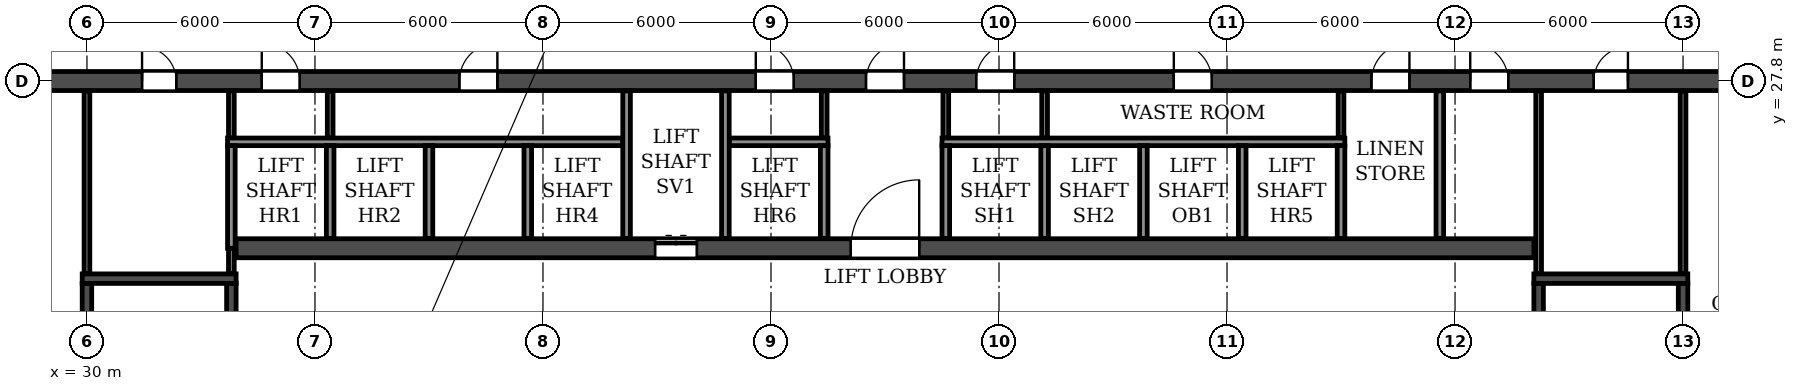
"""IFC4 building model, lengths in metres.
Left out: names, types, materials, properties, quantities, classifications, styles, units other than length and angle.
Written with IfcOpenShell. Run it as: python <this file> out.ifc"""

import sys

from ifc_helpers import new_model, si_unit, direction, frame, frame_2d, origin, place, context, subcontext, project, spatial, rectangle, extrude, element, fill, save


model = new_model("IFC4")
c1 = context("Model", 3, precision=1e-05, world=origin(), true_north=direction((0.0, 1.0)))
c2 = subcontext(c1, "Body", "Model", "MODEL_VIEW")
j1 = project(units=[si_unit("LENGTHUNIT", "METRE"), si_unit("PLANEANGLEUNIT", "RADIAN")], contexts=[c1])
p1 = place(None, origin())
s1 = spatial("IfcSite", under=j1, at=p1, CompositionType="ELEMENT")
p2 = place(p1, origin())
s2 = spatial("IfcBuilding", under=s1, at=p2, CompositionType="ELEMENT")
p3 = place(p2, frame((0.0, 0.0, 112.5)))
s3 = spatial("IfcBuildingStorey", under=s2, at=p3, CompositionType="ELEMENT", Elevation=112.5)
p4 = place(p3, frame((14.6, 27.8, 0.0), z_axis=(0.0, 0.0, 1.0), x_axis=(1.0, 0.0, 0.0)))
e1 = element("IfcWall", 1, at=p4, inside=s3, PredefinedType="SOLIDWALL", context=c2, shape_type="SweptSolid", body=[
    extrude(rectangle(XDim=72.8, YDim=0.5, at=frame_2d((36.4, 0.0))), origin(), (0.0, 0.0, 1.0), 2.95),
])
p5 = place(p4, frame((1.2, 0.0, 0.0)))
e2 = element("IfcOpeningElement", 2, at=p5, cuts=e1, PredefinedType="OPENING", context=c2, shape_type="SweptSolid", body=[
    extrude(rectangle(XDim=1.0, YDim=2.1, at=frame_2d((0.5, 1.05))), frame((0.0, 0.26, 0.0), z_axis=(0.0, -1.0, 0.0), x_axis=(1.0, 0.0, 0.0)), (0.0, 0.0, 1.0), 0.52),
])
p6 = place(p4, frame((4.3, 0.0, 0.0)))
e3 = element("IfcOpeningElement", 3, at=p6, cuts=e1, PredefinedType="OPENING", context=c2, shape_type="SweptSolid", body=[
    extrude(rectangle(XDim=1.0, YDim=2.1, at=frame_2d((0.5, 1.05))), frame((0.0, 0.26, 0.0), z_axis=(0.0, -1.0, 0.0), x_axis=(1.0, 0.0, 0.0)), (0.0, 0.0, 1.0), 0.52),
])
p7 = place(p4, frame((7.65, 0.0, 0.0)))
e4 = element("IfcOpeningElement", 4, at=p7, cuts=e1, PredefinedType="OPENING", context=c2, shape_type="SweptSolid", body=[
    extrude(rectangle(XDim=0.9, YDim=2.1, at=frame_2d((0.45, 1.05))), frame((0.0, 0.26, 0.0), z_axis=(0.0, -1.0, 0.0), x_axis=(1.0, 0.0, 0.0)), (0.0, 0.0, 1.0), 0.52),
])
p8 = place(p4, frame((16.85, 0.0, 0.0)))
e5 = element("IfcOpeningElement", 5, at=p8, cuts=e1, PredefinedType="OPENING", context=c2, shape_type="SweptSolid", body=[
    extrude(rectangle(XDim=0.9, YDim=2.1, at=frame_2d((0.45, 1.05))), frame((0.0, 0.26, 0.0), z_axis=(0.0, -1.0, 0.0), x_axis=(1.0, 0.0, 0.0)), (0.0, 0.0, 1.0), 0.52),
])
p9 = place(p4, frame((20.0, 0.0, 0.0)))
e6 = element("IfcOpeningElement", 6, at=p9, cuts=e1, PredefinedType="OPENING", context=c2, shape_type="SweptSolid", body=[
    extrude(rectangle(XDim=1.0, YDim=2.1, at=frame_2d((0.5, 1.05))), frame((0.0, 0.26, 0.0), z_axis=(0.0, -1.0, 0.0), x_axis=(1.0, 0.0, 0.0)), (0.0, 0.0, 1.0), 0.52),
])
p10 = place(p4, frame((25.2, 0.0, 0.0)))
e7 = element("IfcOpeningElement", 7, at=p10, cuts=e1, PredefinedType="OPENING", context=c2, shape_type="SweptSolid", body=[
    extrude(rectangle(XDim=1.0, YDim=2.1, at=frame_2d((0.5, 1.05))), frame((0.0, 0.26, 0.0), z_axis=(0.0, -1.0, 0.0), x_axis=(1.0, 0.0, 0.0)), (0.0, 0.0, 1.0), 0.52),
])
p11 = place(p4, frame((33.0, 0.0, 0.0)))
e8 = element("IfcOpeningElement", 8, at=p11, cuts=e1, PredefinedType="OPENING", context=c2, shape_type="SweptSolid", body=[
    extrude(rectangle(XDim=1.0, YDim=2.1, at=frame_2d((0.5, 1.05))), frame((0.0, 0.26, 0.0), z_axis=(0.0, -1.0, 0.0), x_axis=(1.0, 0.0, 0.0)), (0.0, 0.0, 1.0), 0.52),
])
p12 = place(p4, frame((35.9, 0.0, 0.0)))
e9 = element("IfcOpeningElement", 9, at=p12, cuts=e1, PredefinedType="OPENING", context=c2, shape_type="SweptSolid", body=[
    extrude(rectangle(XDim=1.0, YDim=2.1, at=frame_2d((0.5, 1.05))), frame((0.0, 0.26, 0.0), z_axis=(0.0, -1.0, 0.0), x_axis=(1.0, 0.0, 0.0)), (0.0, 0.0, 1.0), 0.52),
])
p13 = place(p4, frame((38.8, 0.0, 0.0)))
e10 = element("IfcOpeningElement", 10, at=p13, cuts=e1, PredefinedType="OPENING", context=c2, shape_type="SweptSolid", body=[
    extrude(rectangle(XDim=1.0, YDim=2.1, at=frame_2d((0.5, 1.05))), frame((0.0, 0.26, 0.0), z_axis=(0.0, -1.0, 0.0), x_axis=(1.0, 0.0, 0.0)), (0.0, 0.0, 1.0), 0.52),
])
p14 = place(p4, frame((44.0, 0.0, 0.0)))
e11 = element("IfcOpeningElement", 11, at=p14, cuts=e1, PredefinedType="OPENING", context=c2, shape_type="SweptSolid", body=[
    extrude(rectangle(XDim=1.0, YDim=2.1, at=frame_2d((0.5, 1.05))), frame((0.0, 0.26, 0.0), z_axis=(0.0, -1.0, 0.0), x_axis=(1.0, 0.0, 0.0)), (0.0, 0.0, 1.0), 0.52),
])
p15 = place(p4, frame((49.2, 0.0, 0.0)))
e12 = element("IfcOpeningElement", 12, at=p15, cuts=e1, PredefinedType="OPENING", context=c2, shape_type="SweptSolid", body=[
    extrude(rectangle(XDim=1.0, YDim=2.1, at=frame_2d((0.5, 1.05))), frame((0.0, 0.26, 0.0), z_axis=(0.0, -1.0, 0.0), x_axis=(1.0, 0.0, 0.0)), (0.0, 0.0, 1.0), 0.52),
])
p16 = place(p4, frame((51.8, 0.0, 0.0)))
e13 = element("IfcOpeningElement", 13, at=p16, cuts=e1, PredefinedType="OPENING", context=c2, shape_type="SweptSolid", body=[
    extrude(rectangle(XDim=1.0, YDim=2.1, at=frame_2d((0.5, 1.05))), frame((0.0, 0.26, 0.0), z_axis=(0.0, -1.0, 0.0), x_axis=(1.0, 0.0, 0.0)), (0.0, 0.0, 1.0), 0.52),
])
p17 = place(p4, frame((55.05, 0.0, 0.0)))
e14 = element("IfcOpeningElement", 14, at=p17, cuts=e1, PredefinedType="OPENING", context=c2, shape_type="SweptSolid", body=[
    extrude(rectangle(XDim=0.9, YDim=2.1, at=frame_2d((0.45, 1.05))), frame((0.0, 0.26, 0.0), z_axis=(0.0, -1.0, 0.0), x_axis=(1.0, 0.0, 0.0)), (0.0, 0.0, 1.0), 0.52),
])
p18 = place(p4, frame((64.25, 0.0, 0.0)))
e15 = element("IfcOpeningElement", 15, at=p18, cuts=e1, PredefinedType="OPENING", context=c2, shape_type="SweptSolid", body=[
    extrude(rectangle(XDim=0.9, YDim=2.1, at=frame_2d((0.45, 1.05))), frame((0.0, 0.26, 0.0), z_axis=(0.0, -1.0, 0.0), x_axis=(1.0, 0.0, 0.0)), (0.0, 0.0, 1.0), 0.52),
])
p19 = place(p4, frame((67.5, 0.0, 0.0)))
e16 = element("IfcOpeningElement", 16, at=p19, cuts=e1, PredefinedType="OPENING", context=c2, shape_type="SweptSolid", body=[
    extrude(rectangle(XDim=1.0, YDim=2.1, at=frame_2d((0.5, 1.05))), frame((0.0, 0.26, 0.0), z_axis=(0.0, -1.0, 0.0), x_axis=(1.0, 0.0, 0.0)), (0.0, 0.0, 1.0), 0.52),
])
p20 = place(p4, frame((70.6, 0.0, 0.0)))
e17 = element("IfcOpeningElement", 17, at=p20, cuts=e1, PredefinedType="OPENING", context=c2, shape_type="SweptSolid", body=[
    extrude(rectangle(XDim=1.0, YDim=2.1, at=frame_2d((0.5, 1.05))), frame((0.0, 0.26, 0.0), z_axis=(0.0, -1.0, 0.0), x_axis=(1.0, 0.0, 0.0)), (0.0, 0.0, 1.0), 0.52),
])
p21 = place(p3, frame((33.925, 23.4, 0.0), z_axis=(0.0, 0.0, 1.0), x_axis=(1.0, 0.0, 0.0)))
e18 = element("IfcWall", 18, at=p21, inside=s3, PredefinedType="SOLIDWALL", context=c2, shape_type="SweptSolid", body=[
    extrude(rectangle(XDim=34.15, YDim=0.5, at=frame_2d((17.075, 0.0))), origin(), (0.0, 0.0, 1.0), 2.95),
])
p22 = place(p21, frame((16.175, 0.0, 0.0)))
e19 = element("IfcOpeningElement", 19, at=p22, cuts=e18, PredefinedType="OPENING", context=c2, shape_type="SweptSolid", body=[
    extrude(rectangle(XDim=1.8, YDim=2.1, at=frame_2d((0.9, 1.05))), frame((0.0, 0.26, 0.0), z_axis=(0.0, -1.0, 0.0), x_axis=(1.0, 0.0, 0.0)), (0.0, 0.0, 1.0), 0.52),
])
p23 = place(p21, frame((11.025, 0.0, 0.0)))
e20 = element("IfcOpeningElement", 20, at=p23, cuts=e18, PredefinedType="OPENING", context=c2, shape_type="SweptSolid", body=[
    extrude(rectangle(XDim=1.1, YDim=2.1, at=frame_2d((0.55, 1.05))), frame((0.0, 0.26, 0.0), z_axis=(0.0, -1.0, 0.0), x_axis=(1.0, 0.0, 0.0)), (0.0, 0.0, 1.0), 0.52),
])
p24 = place(p3, frame((30.0, 14.85, 0.0), z_axis=(0.0, 0.0, 1.0), x_axis=(0.0, 1.0, 0.0)))
e21 = element("IfcWall", 21, at=p24, inside=s3, PredefinedType="SOLIDWALL", context=c2, shape_type="SweptSolid", body=[
    extrude(rectangle(XDim=7.625, YDim=0.25, at=frame_2d((3.812, 0.0))), origin(), (0.0, 0.0, 1.0), 2.95),
])
p25 = place(p3, frame((33.8, 14.85, 0.0), z_axis=(0.0, 0.0, 1.0), x_axis=(0.0, 1.0, 0.0)))
e22 = element("IfcWall", 22, at=p25, inside=s3, PredefinedType="SOLIDWALL", context=c2, shape_type="SweptSolid", body=[
    extrude(rectangle(XDim=7.625, YDim=0.25, at=frame_2d((3.812, 0.0))), origin(), (0.0, 0.0, 1.0), 2.95),
])
p26 = place(p25, frame((0.45, 0.0, 0.0)))
e23 = element("IfcOpeningElement", 23, at=p26, cuts=e22, PredefinedType="OPENING", context=c2, shape_type="SweptSolid", body=[
    extrude(rectangle(XDim=1.0, YDim=2.1, at=frame_2d((0.5, 1.05))), frame((0.0, 0.135, 0.0), z_axis=(0.0, -1.0, 0.0), x_axis=(1.0, 0.0, 0.0)), (0.0, 0.0, 1.0), 0.27),
])
p27 = place(p3, frame((29.875, 22.6, 0.0), z_axis=(0.0, 0.0, 1.0), x_axis=(1.0, 0.0, 0.0)))
e24 = element("IfcWall", 24, at=p27, inside=s3, PredefinedType="SOLIDWALL", context=c2, shape_type="SweptSolid", body=[
    extrude(rectangle(XDim=4.05, YDim=0.25, at=frame_2d((2.025, 0.0))), origin(), (0.0, 0.0, 1.0), 2.95),
])
p28 = place(p3, frame((68.2, 14.85, 0.0), z_axis=(0.0, 0.0, 1.0), x_axis=(0.0, 1.0, 0.0)))
e25 = element("IfcWall", 25, at=p28, inside=s3, PredefinedType="SOLIDWALL", context=c2, shape_type="SweptSolid", body=[
    extrude(rectangle(XDim=7.625, YDim=0.25, at=frame_2d((3.812, 0.0))), origin(), (0.0, 0.0, 1.0), 2.95),
])
p29 = place(p28, frame((0.45, 0.0, 0.0)))
e26 = element("IfcOpeningElement", 26, at=p29, cuts=e25, PredefinedType="OPENING", context=c2, shape_type="SweptSolid", body=[
    extrude(rectangle(XDim=1.0, YDim=2.1, at=frame_2d((0.5, 1.05))), frame((0.0, 0.135, 0.0), z_axis=(0.0, -1.0, 0.0), x_axis=(1.0, 0.0, 0.0)), (0.0, 0.0, 1.0), 0.27),
])
p30 = place(p3, frame((72.0, 14.85, 0.0), z_axis=(0.0, 0.0, 1.0), x_axis=(0.0, 1.0, 0.0)))
e27 = element("IfcWall", 27, at=p30, inside=s3, PredefinedType="SOLIDWALL", context=c2, shape_type="SweptSolid", body=[
    extrude(rectangle(XDim=7.625, YDim=0.25, at=frame_2d((3.812, 0.0))), origin(), (0.0, 0.0, 1.0), 2.95),
])
p31 = place(p3, frame((68.075, 22.6, 0.0), z_axis=(0.0, 0.0, 1.0), x_axis=(1.0, 0.0, 0.0)))
e28 = element("IfcWall", 28, at=p31, inside=s3, PredefinedType="SOLIDWALL", context=c2, shape_type="SweptSolid", body=[
    extrude(rectangle(XDim=4.05, YDim=0.25, at=frame_2d((2.025, 0.0))), origin(), (0.0, 0.0, 1.0), 2.95),
])
for number, where, z_axis, x_axis in (
    (29, (49.4, 26.3, 0.0), (0.0, 0.0, 1.0), (0.0, 1.0, 0.0)),
    (30, (52.6, 26.3, 0.0), (0.0, 0.0, 1.0), (0.0, 1.0, 0.0)),
    (31, (36.4, 26.3, 0.0), (0.0, 0.0, 1.0), (0.0, 1.0, 0.0)),
    (32, (55.2, 26.3, 0.0), (0.0, 0.0, 1.0), (0.0, 1.0, 0.0)),
    (33, (63.0, 26.3, 0.0), (0.0, 0.0, 1.0), (0.0, 1.0, 0.0)),
):
    element("IfcWall", number, at=place(p3, frame(where, z_axis=z_axis, x_axis=x_axis)), inside=s3, PredefinedType="PARTITIONING", context=c2, shape_type="SweptSolid", body=[
        extrude(rectangle(XDim=1.24, YDim=0.15, at=frame_2d((0.62, 0.0))), origin(), (0.0, 0.0, 1.0), 2.95),
    ])
p32 = place(p3, frame((65.6, 23.66, 0.0), z_axis=(0.0, 0.0, 1.0), x_axis=(0.0, 1.0, 0.0)))
e34 = element("IfcWall", 34, at=p32, inside=s3, PredefinedType="PARTITIONING", context=c2, shape_type="SweptSolid", body=[
    extrude(rectangle(XDim=3.88, YDim=0.2, at=frame_2d((1.94, 0.0))), origin(), (0.0, 0.0, 1.0), 2.95),
])
p33 = place(p3, frame((30.0, 22.735, 0.0), z_axis=(0.0, 0.0, 1.0), x_axis=(0.0, 1.0, 0.0)))
e35 = element("IfcWall", 35, at=p33, inside=s3, PredefinedType="PARTITIONING", context=c2, shape_type="SweptSolid", body=[
    extrude(rectangle(XDim=4.805, YDim=0.15, at=frame_2d((2.402, 0.0))), origin(), (0.0, 0.0, 1.0), 2.95),
])
p34 = place(p3, frame((33.8, 22.735, 0.0), z_axis=(0.0, 0.0, 1.0), x_axis=(0.0, 1.0, 0.0)))
e36 = element("IfcWall", 36, at=p34, inside=s3, PredefinedType="PARTITIONING", context=c2, shape_type="SweptSolid", body=[
    extrude(rectangle(XDim=0.665, YDim=0.15, at=frame_2d((0.333, 0.0))), origin(), (0.0, 0.0, 1.0), 2.95),
])
p35 = place(p3, frame((33.8, 26.3, 0.0), z_axis=(0.0, 0.0, 1.0), x_axis=(0.0, 1.0, 0.0)))
e37 = element("IfcWall", 37, at=p35, inside=s3, PredefinedType="PARTITIONING", context=c2, shape_type="SweptSolid", body=[
    extrude(rectangle(XDim=1.24, YDim=0.15, at=frame_2d((0.62, 0.0))), origin(), (0.0, 0.0, 1.0), 2.95),
])
for number, where, z_axis, x_axis in (
    (38, (68.2, 22.735, 0.0), (0.0, 0.0, 1.0), (0.0, 1.0, 0.0)),
    (39, (72.0, 22.735, 0.0), (0.0, 0.0, 1.0), (0.0, 1.0, 0.0)),
):
    element("IfcWall", number, at=place(p3, frame(where, z_axis=z_axis, x_axis=x_axis)), inside=s3, PredefinedType="PARTITIONING", context=c2, shape_type="SweptSolid", body=[
        extrude(rectangle(XDim=4.805, YDim=0.15, at=frame_2d((2.402, 0.0))), origin(), (0.0, 0.0, 1.0), 2.95),
    ])
p36 = place(p3, frame((33.7, 26.2, 0.0), z_axis=(0.0, 0.0, 1.0), x_axis=(1.0, 0.0, 0.0)))
e40 = element("IfcWall", 40, at=p36, inside=s3, PredefinedType="PARTITIONING", context=c2, shape_type="SweptSolid", body=[
    extrude(rectangle(XDim=10.4, YDim=0.2, at=frame_2d((5.2, 0.0))), origin(), (0.0, 0.0, 1.0), 2.95),
])
p37 = place(p3, frame((46.9, 26.2, 0.0), z_axis=(0.0, 0.0, 1.0), x_axis=(1.0, 0.0, 0.0)))
e41 = element("IfcWall", 41, at=p37, inside=s3, PredefinedType="PARTITIONING", context=c2, shape_type="SweptSolid", body=[
    extrude(rectangle(XDim=2.6, YDim=0.2, at=frame_2d((1.3, 0.0))), origin(), (0.0, 0.0, 1.0), 2.95),
])
p38 = place(p3, frame((52.5, 26.2, 0.0), z_axis=(0.0, 0.0, 1.0), x_axis=(1.0, 0.0, 0.0)))
e42 = element("IfcWall", 42, at=p38, inside=s3, PredefinedType="PARTITIONING", context=c2, shape_type="SweptSolid", body=[
    extrude(rectangle(XDim=10.6, YDim=0.2, at=frame_2d((5.3, 0.0))), origin(), (0.0, 0.0, 1.0), 2.95),
])
p39 = place(p3, frame((33.8, 23.4, 0.0), z_axis=(0.0, 0.0, 1.0), x_axis=(0.0, 1.0, 0.0)))
e43 = element("IfcWall", 43, at=p39, inside=s3, PredefinedType="PARTITIONING", context=c2, shape_type="SweptSolid", body=[
    extrude(rectangle(XDim=2.7, YDim=0.2, at=frame_2d((1.35, 0.0))), origin(), (0.0, 0.0, 1.0), 2.95),
])
for number, where, z_axis, x_axis in (
    (44, (36.4, 23.66, 0.0), (0.0, 0.0, 1.0), (0.0, 1.0, 0.0)),
    (45, (39.0, 23.66, 0.0), (0.0, 0.0, 1.0), (0.0, 1.0, 0.0)),
    (46, (41.6, 23.66, 0.0), (0.0, 0.0, 1.0), (0.0, 1.0, 0.0)),
):
    element("IfcWall", number, at=place(p3, frame(where, z_axis=z_axis, x_axis=x_axis)), inside=s3, PredefinedType="PARTITIONING", context=c2, shape_type="SweptSolid", body=[
        extrude(rectangle(XDim=2.44, YDim=0.2, at=frame_2d((1.22, 0.0))), origin(), (0.0, 0.0, 1.0), 2.95),
    ])
for number, where, z_axis, x_axis in (
    (47, (44.2, 23.66, 0.0), (0.0, 0.0, 1.0), (0.0, 1.0, 0.0)),
    (48, (46.8, 23.66, 0.0), (0.0, 0.0, 1.0), (0.0, 1.0, 0.0)),
):
    element("IfcWall", number, at=place(p3, frame(where, z_axis=z_axis, x_axis=x_axis)), inside=s3, PredefinedType="PARTITIONING", context=c2, shape_type="SweptSolid", body=[
        extrude(rectangle(XDim=3.88, YDim=0.2, at=frame_2d((1.94, 0.0))), origin(), (0.0, 0.0, 1.0), 2.95),
    ])
for number, where, z_axis, x_axis in (
    (49, (49.4, 23.66, 0.0), (0.0, 0.0, 1.0), (0.0, 1.0, 0.0)),
    (50, (52.6, 23.66, 0.0), (0.0, 0.0, 1.0), (0.0, 1.0, 0.0)),
    (51, (55.2, 23.66, 0.0), (0.0, 0.0, 1.0), (0.0, 1.0, 0.0)),
    (52, (57.8, 23.66, 0.0), (0.0, 0.0, 1.0), (0.0, 1.0, 0.0)),
    (53, (60.4, 23.66, 0.0), (0.0, 0.0, 1.0), (0.0, 1.0, 0.0)),
    (54, (63.0, 23.66, 0.0), (0.0, 0.0, 1.0), (0.0, 1.0, 0.0)),
):
    element("IfcWall", number, at=place(p3, frame(where, z_axis=z_axis, x_axis=x_axis)), inside=s3, PredefinedType="PARTITIONING", context=c2, shape_type="SweptSolid", body=[
        extrude(rectangle(XDim=2.44, YDim=0.2, at=frame_2d((1.22, 0.0))), origin(), (0.0, 0.0, 1.0), 2.95),
    ])
p40 = place(p8, origin())
e55 = element("IfcDoor", 55, at=p40, inside=s3, OperationType="SINGLE_SWING_LEFT", PredefinedType="DOOR", context=c2, shape_type="SweptSolid", body=[
    extrude(rectangle(XDim=0.9, YDim=2.1, at=frame_2d((0.45, 1.05))), frame((0.0, 0.025, 0.0), z_axis=(0.0, -1.0, 0.0), x_axis=(1.0, 0.0, 0.0)), (0.0, 0.0, 1.0), 0.05),
])
fill(e5, e55)
p41 = place(p9, origin())
e56 = element("IfcDoor", 56, at=p41, inside=s3, OperationType="SINGLE_SWING_LEFT", PredefinedType="DOOR", context=c2, shape_type="SweptSolid", body=[
    extrude(rectangle(XDim=1.0, YDim=2.1, at=frame_2d((0.5, 1.05))), frame((0.0, 0.025, 0.0), z_axis=(0.0, -1.0, 0.0), x_axis=(1.0, 0.0, 0.0)), (0.0, 0.0, 1.0), 0.05),
])
fill(e6, e56)
p42 = place(p10, origin())
e57 = element("IfcDoor", 57, at=p42, inside=s3, OperationType="SINGLE_SWING_RIGHT", PredefinedType="DOOR", context=c2, shape_type="SweptSolid", body=[
    extrude(rectangle(XDim=1.0, YDim=2.1, at=frame_2d((0.5, 1.05))), frame((0.0, 0.025, 0.0), z_axis=(0.0, -1.0, 0.0), x_axis=(1.0, 0.0, 0.0)), (0.0, 0.0, 1.0), 0.05),
])
fill(e7, e57)
p43 = place(p11, origin())
e58 = element("IfcDoor", 58, at=p43, inside=s3, OperationType="SINGLE_SWING_LEFT", PredefinedType="DOOR", context=c2, shape_type="SweptSolid", body=[
    extrude(rectangle(XDim=1.0, YDim=2.1, at=frame_2d((0.5, 1.05))), frame((0.0, 0.025, 0.0), z_axis=(0.0, -1.0, 0.0), x_axis=(1.0, 0.0, 0.0)), (0.0, 0.0, 1.0), 0.05),
])
fill(e8, e58)
p44 = place(p12, origin())
e59 = element("IfcDoor", 59, at=p44, inside=s3, OperationType="SINGLE_SWING_RIGHT", PredefinedType="DOOR", context=c2, shape_type="SweptSolid", body=[
    extrude(rectangle(XDim=1.0, YDim=2.1, at=frame_2d((0.5, 1.05))), frame((0.0, 0.025, 0.0), z_axis=(0.0, -1.0, 0.0), x_axis=(1.0, 0.0, 0.0)), (0.0, 0.0, 1.0), 0.05),
])
fill(e9, e59)
p45 = place(p13, origin())
e60 = element("IfcDoor", 60, at=p45, inside=s3, OperationType="SINGLE_SWING_RIGHT", PredefinedType="DOOR", context=c2, shape_type="SweptSolid", body=[
    extrude(rectangle(XDim=1.0, YDim=2.1, at=frame_2d((0.5, 1.05))), frame((0.0, 0.025, 0.0), z_axis=(0.0, -1.0, 0.0), x_axis=(1.0, 0.0, 0.0)), (0.0, 0.0, 1.0), 0.05),
])
fill(e10, e60)
p46 = place(p14, origin())
e61 = element("IfcDoor", 61, at=p46, inside=s3, OperationType="SINGLE_SWING_LEFT", PredefinedType="DOOR", context=c2, shape_type="SweptSolid", body=[
    extrude(rectangle(XDim=1.0, YDim=2.1, at=frame_2d((0.5, 1.05))), frame((0.0, 0.025, 0.0), z_axis=(0.0, -1.0, 0.0), x_axis=(1.0, 0.0, 0.0)), (0.0, 0.0, 1.0), 0.05),
])
fill(e11, e61)
p47 = place(p15, origin())
e62 = element("IfcDoor", 62, at=p47, inside=s3, OperationType="SINGLE_SWING_RIGHT", PredefinedType="DOOR", context=c2, shape_type="SweptSolid", body=[
    extrude(rectangle(XDim=1.0, YDim=2.1, at=frame_2d((0.5, 1.05))), frame((0.0, 0.025, 0.0), z_axis=(0.0, -1.0, 0.0), x_axis=(1.0, 0.0, 0.0)), (0.0, 0.0, 1.0), 0.05),
])
fill(e12, e62)
p48 = place(p16, origin())
e63 = element("IfcDoor", 63, at=p48, inside=s3, OperationType="SINGLE_SWING_LEFT", PredefinedType="DOOR", context=c2, shape_type="SweptSolid", body=[
    extrude(rectangle(XDim=1.0, YDim=2.1, at=frame_2d((0.5, 1.05))), frame((0.0, 0.025, 0.0), z_axis=(0.0, -1.0, 0.0), x_axis=(1.0, 0.0, 0.0)), (0.0, 0.0, 1.0), 0.05),
])
fill(e13, e63)
p49 = place(p17, origin())
e64 = element("IfcDoor", 64, at=p49, inside=s3, OperationType="SINGLE_SWING_RIGHT", PredefinedType="DOOR", context=c2, shape_type="SweptSolid", body=[
    extrude(rectangle(XDim=0.9, YDim=2.1, at=frame_2d((0.45, 1.05))), frame((0.0, 0.025, 0.0), z_axis=(0.0, -1.0, 0.0), x_axis=(1.0, 0.0, 0.0)), (0.0, 0.0, 1.0), 0.05),
])
fill(e14, e64)
p50 = place(p22, origin())
e65 = element("IfcDoor", 65, at=p50, inside=s3, OperationType="DOUBLE_DOOR_SINGLE_SWING", PredefinedType="DOOR", context=c2, shape_type="SweptSolid", body=[
    extrude(rectangle(XDim=1.8, YDim=2.1, at=frame_2d((0.9, 1.05))), frame((0.0, 0.025, 0.0), z_axis=(0.0, -1.0, 0.0), x_axis=(1.0, 0.0, 0.0)), (0.0, 0.0, 1.0), 0.05),
])
fill(e19, e65)
p51 = place(p23, origin())
e66 = element("IfcDoor", 66, at=p51, inside=s3, OperationType="DOUBLE_DOOR_SLIDING", PredefinedType="DOOR", context=c2, shape_type="SweptSolid", body=[
    extrude(rectangle(XDim=1.1, YDim=2.1, at=frame_2d((0.55, 1.05))), frame((0.0, 0.025, 0.0), z_axis=(0.0, -1.0, 0.0), x_axis=(1.0, 0.0, 0.0)), (0.0, 0.0, 1.0), 0.05),
])
fill(e20, e66)
save(model, sys.argv[1])
